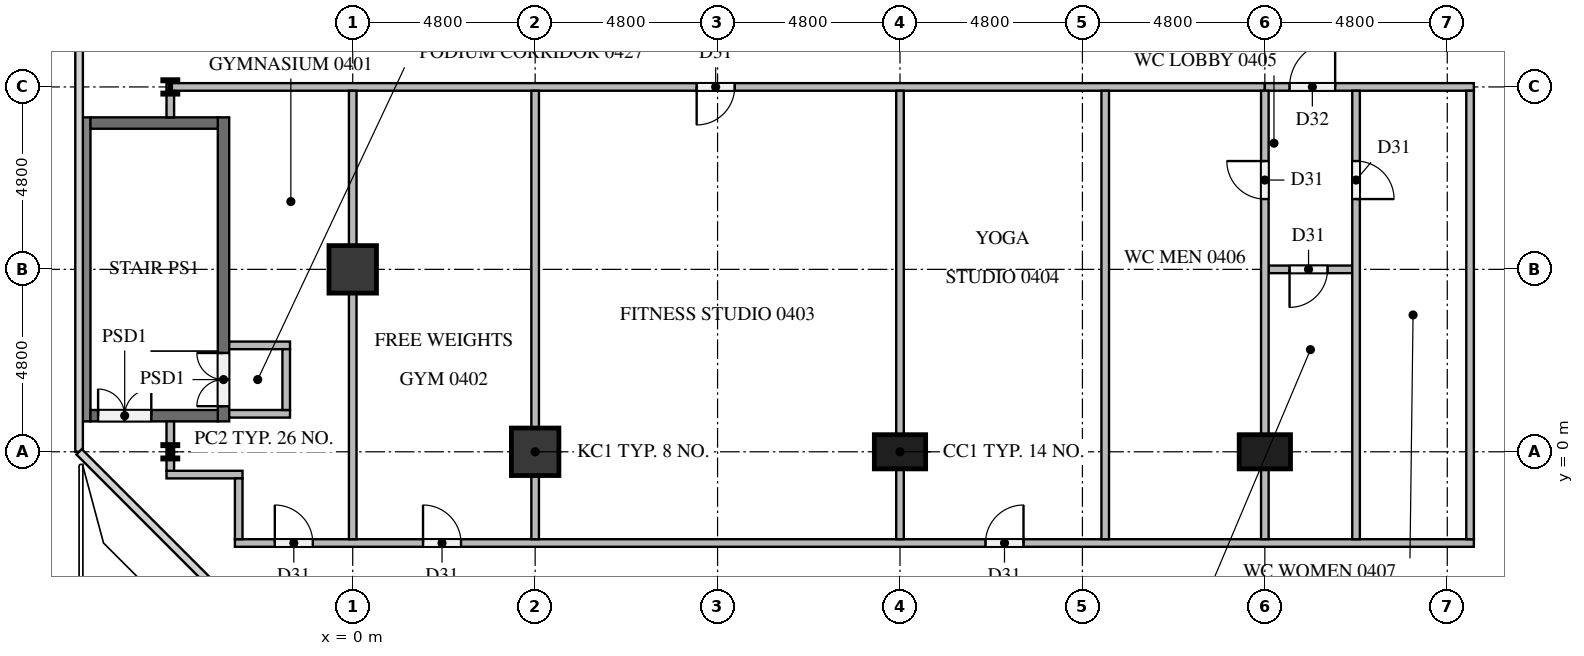
"""IFC4 building model, lengths in metres.
Left out: names, types, materials, properties, quantities, classifications, styles, units other than length and angle.
Written with IfcOpenShell. Run it as: python <this file> out.ifc"""

import sys

from ifc_helpers import new_model, si_unit, direction, frame, frame_2d, origin, origin_2d, place, context, subcontext, project, spatial, rectangle, i_section, extrude, element, fill, save


model = new_model("IFC4")
c1 = context("Model", 3, precision=1e-05, world=origin(), true_north=direction((0.0, 1.0)))
c2 = subcontext(c1, "Body", "Model", "MODEL_VIEW")
j1 = project(units=[si_unit("LENGTHUNIT", "METRE"), si_unit("PLANEANGLEUNIT", "RADIAN")], contexts=[c1])
p1 = place(None, origin())
s1 = spatial("IfcSite", under=j1, at=p1, CompositionType="ELEMENT")
p2 = place(p1, origin())
s2 = spatial("IfcBuilding", under=s1, at=p2, CompositionType="ELEMENT")
p3 = place(p2, frame((0.0, 0.0, 19.5)))
s3 = spatial("IfcBuildingStorey", under=s2, at=p3, CompositionType="ELEMENT", Elevation=19.5)
p4 = place(p3, frame((-7.05, 0.8, 0.0), z_axis=(0.0, 0.0, 1.0), x_axis=(0.0, 1.0, 0.0)))
e1 = element("IfcWall", 1, at=p4, inside=s3, PredefinedType="SOLIDWALL", context=c2, shape_type="SweptSolid", body=[
    extrude(rectangle(XDim=8.0, YDim=0.3, at=frame_2d((4.0, 0.0))), origin(), (0.0, 0.0, 1.0), 4.1),
])
p5 = place(p3, frame((-3.4, 0.8, 0.0), z_axis=(0.0, 0.0, 1.0), x_axis=(0.0, 1.0, 0.0)))
e2 = element("IfcWall", 2, at=p5, inside=s3, PredefinedType="SOLIDWALL", context=c2, shape_type="SweptSolid", body=[
    extrude(rectangle(XDim=8.0, YDim=0.3, at=frame_2d((4.0, 0.0))), origin(), (0.0, 0.0, 1.0), 4.1),
])
p6 = place(p5, frame((0.4, 0.0, 0.0)))
e3 = element("IfcOpeningElement", 3, at=p6, cuts=e2, PredefinedType="OPENING", context=c2, shape_type="SweptSolid", body=[
    extrude(rectangle(XDim=1.4, YDim=2.1, at=frame_2d((0.7, 1.05))), frame((0.0, 0.16, 0.0), z_axis=(0.0, -1.0, 0.0), x_axis=(1.0, 0.0, 0.0)), (0.0, 0.0, 1.0), 0.32),
])
p7 = place(p3, frame((-6.9, 0.95, 0.0), z_axis=(0.0, 0.0, 1.0), x_axis=(1.0, 0.0, 0.0)))
e4 = element("IfcWall", 4, at=p7, inside=s3, PredefinedType="SOLIDWALL", context=c2, shape_type="SweptSolid", body=[
    extrude(rectangle(XDim=3.35, YDim=0.3, at=frame_2d((1.675, 0.0))), origin(), (0.0, 0.0, 1.0), 4.1),
])
p8 = place(p7, frame((0.2, 0.0, 0.0)))
e5 = element("IfcOpeningElement", 5, at=p8, cuts=e4, PredefinedType="OPENING", context=c2, shape_type="SweptSolid", body=[
    extrude(rectangle(XDim=1.4, YDim=2.1, at=frame_2d((0.7, 1.05))), frame((0.0, 0.16, 0.0), z_axis=(0.0, -1.0, 0.0), x_axis=(1.0, 0.0, 0.0)), (0.0, 0.0, 1.0), 0.32),
])
p9 = place(p3, frame((-6.9, 8.65, 0.0), z_axis=(0.0, 0.0, 1.0), x_axis=(1.0, 0.0, 0.0)))
e6 = element("IfcWall", 6, at=p9, inside=s3, PredefinedType="SOLIDWALL", context=c2, shape_type="SweptSolid", body=[
    extrude(rectangle(XDim=3.35, YDim=0.3, at=frame_2d((1.675, 0.0))), origin(), (0.0, 0.0, 1.0), 4.1),
])
p10 = place(p3, frame((4.8, 0.0, 0.0), z_axis=(0.0, 0.0, 1.0), x_axis=(1.0, 0.0, 0.0)))
e7 = element("IfcColumn", 7, at=p10, inside=s3, PredefinedType="COLUMN", context=c2, shape_type="SweptSolid", body=[
    extrude(rectangle(XDim=1.25, YDim=1.25, at=origin_2d()), origin(), (0.0, 0.0, 1.0), 4.1),
])
for number, where, z_axis, x_axis in (
    (8, (14.4, 0.0, 0.0), (0.0, 0.0, 1.0), (1.0, 0.0, 0.0)),
    (9, (24.0, 0.0, 0.0), (0.0, 0.0, 1.0), (1.0, 0.0, 0.0)),
):
    element("IfcColumn", number, at=place(p3, frame(where, z_axis=z_axis, x_axis=x_axis)), inside=s3, PredefinedType="COLUMN", context=c2, shape_type="SweptSolid", body=[
        extrude(rectangle(XDim=1.35, YDim=0.9, at=origin_2d()), origin(), (0.0, 0.0, 1.0), 4.1),
    ])
p11 = place(p3, frame((0.0, 4.8, 0.0), z_axis=(0.0, 0.0, 1.0), x_axis=(1.0, 0.0, 0.0)))
e10 = element("IfcColumn", 10, at=p11, inside=s3, PredefinedType="COLUMN", context=c2, shape_type="SweptSolid", body=[
    extrude(rectangle(XDim=1.25, YDim=1.25, at=origin_2d()), origin(), (0.0, 0.0, 1.0), 4.1),
])
for number, where, z_axis, x_axis in (
    (11, (-4.8, 0.0, 0.0), (0.0, 0.0, 1.0), (1.0, 0.0, 0.0)),
    (12, (-4.8, 9.6, 0.0), (0.0, 0.0, 1.0), (1.0, 0.0, 0.0)),
):
    element("IfcColumn", number, at=place(p3, frame(where, z_axis=z_axis, x_axis=x_axis)), inside=s3, PredefinedType="COLUMN", context=c2, shape_type="SweptSolid", body=[
        extrude(i_section(OverallWidth=0.396, OverallDepth=0.381, WebThickness=0.019, FlangeThickness=0.03, at=origin_2d()), origin(), (0.0, 0.0, 1.0), 4.1),
    ])
p12 = place(p3, frame((-3.1, -2.4, 0.0), z_axis=(0.0, 0.0, 1.0), x_axis=(1.0, 0.0, 0.0)))
e13 = element("IfcWall", 13, at=p12, inside=s3, PredefinedType="PARTITIONING", context=c2, shape_type="SweptSolid", body=[
    extrude(rectangle(XDim=32.6, YDim=0.2, at=frame_2d((16.3, 0.0))), origin(), (0.0, 0.0, 1.0), 4.1),
])
p13 = place(p12, frame((1.05, 0.0, 0.0)))
e14 = element("IfcOpeningElement", 14, at=p13, cuts=e13, PredefinedType="OPENING", context=c2, shape_type="SweptSolid", body=[
    extrude(rectangle(XDim=1.0, YDim=2.1, at=frame_2d((0.5, 1.05))), frame((0.0, 0.11, 0.0), z_axis=(0.0, -1.0, 0.0), x_axis=(1.0, 0.0, 0.0)), (0.0, 0.0, 1.0), 0.22),
])
p14 = place(p12, frame((4.95, 0.0, 0.0)))
e15 = element("IfcOpeningElement", 15, at=p14, cuts=e13, PredefinedType="OPENING", context=c2, shape_type="SweptSolid", body=[
    extrude(rectangle(XDim=1.0, YDim=2.1, at=frame_2d((0.5, 1.05))), frame((0.0, 0.11, 0.0), z_axis=(0.0, -1.0, 0.0), x_axis=(1.0, 0.0, 0.0)), (0.0, 0.0, 1.0), 0.22),
])
p15 = place(p12, frame((19.75, 0.0, 0.0)))
e16 = element("IfcOpeningElement", 16, at=p15, cuts=e13, PredefinedType="OPENING", context=c2, shape_type="SweptSolid", body=[
    extrude(rectangle(XDim=1.0, YDim=2.1, at=frame_2d((0.5, 1.05))), frame((0.0, 0.11, 0.0), z_axis=(0.0, -1.0, 0.0), x_axis=(1.0, 0.0, 0.0)), (0.0, 0.0, 1.0), 0.22),
])
p16 = place(p3, frame((-4.9, -0.6, 0.0), z_axis=(0.0, 0.0, 1.0), x_axis=(1.0, 0.0, 0.0)))
e17 = element("IfcWall", 17, at=p16, inside=s3, PredefinedType="PARTITIONING", context=c2, shape_type="SweptSolid", body=[
    extrude(rectangle(XDim=2.0, YDim=0.2, at=frame_2d((1.0, 0.0))), origin(), (0.0, 0.0, 1.0), 4.1),
])
for number, where, z_axis, x_axis in (
    (18, (-3.25, 1.0, 0.0), (0.0, 0.0, 1.0), (1.0, 0.0, 0.0)),
    (19, (-3.25, 2.8, 0.0), (0.0, 0.0, 1.0), (1.0, 0.0, 0.0)),
):
    element("IfcWall", number, at=place(p3, frame(where, z_axis=z_axis, x_axis=x_axis)), inside=s3, PredefinedType="PARTITIONING", context=c2, shape_type="SweptSolid", body=[
        extrude(rectangle(XDim=1.6, YDim=0.2, at=frame_2d((0.8, 0.0))), origin(), (0.0, 0.0, 1.0), 4.1),
    ])
p17 = place(p3, frame((26.3, 4.8, 0.0), z_axis=(0.0, 0.0, 1.0), x_axis=(-1.0, 0.0, 0.0)))
e20 = element("IfcWall", 20, at=p17, inside=s3, PredefinedType="PARTITIONING", context=c2, shape_type="SweptSolid", body=[
    extrude(rectangle(XDim=2.2, YDim=0.2, at=frame_2d((1.1, 0.0))), origin(), (0.0, 0.0, 1.0), 4.1),
])
p18 = place(p17, frame((0.65, 0.0, 0.0)))
e21 = element("IfcOpeningElement", 21, at=p18, cuts=e20, PredefinedType="OPENING", context=c2, shape_type="SweptSolid", body=[
    extrude(rectangle(XDim=1.0, YDim=2.1, at=frame_2d((0.5, 1.05))), frame((0.0, 0.11, 0.0), z_axis=(0.0, -1.0, 0.0), x_axis=(1.0, 0.0, 0.0)), (0.0, 0.0, 1.0), 0.22),
])
p19 = place(p3, frame((24.0, 9.6, 0.0), z_axis=(0.0, 0.0, 1.0), x_axis=(-1.0, 0.0, 0.0)))
e22 = element("IfcWall", 22, at=p19, inside=s3, PredefinedType="PARTITIONING", context=c2, shape_type="SweptSolid", body=[
    extrude(rectangle(XDim=28.9, YDim=0.2, at=frame_2d((14.45, 0.0))), origin(), (0.0, 0.0, 1.0), 4.1),
])
p20 = place(p19, frame((13.95, 0.0, 0.0)))
e23 = element("IfcOpeningElement", 23, at=p20, cuts=e22, PredefinedType="OPENING", context=c2, shape_type="SweptSolid", body=[
    extrude(rectangle(XDim=1.0, YDim=2.1, at=frame_2d((0.5, 1.05))), frame((0.0, 0.11, 0.0), z_axis=(0.0, -1.0, 0.0), x_axis=(1.0, 0.0, 0.0)), (0.0, 0.0, 1.0), 0.22),
])
p21 = place(p3, frame((24.0, 9.6, 0.0), z_axis=(0.0, 0.0, 1.0), x_axis=(1.0, 0.0, 0.0)))
e24 = element("IfcWall", 24, at=p21, inside=s3, PredefinedType="PARTITIONING", context=c2, shape_type="SweptSolid", body=[
    extrude(rectangle(XDim=5.5, YDim=0.2, at=frame_2d((2.75, 0.0))), origin(), (0.0, 0.0, 1.0), 4.1),
])
p22 = place(p21, frame((0.65, 0.0, 0.0)))
e25 = element("IfcOpeningElement", 25, at=p22, cuts=e24, PredefinedType="OPENING", context=c2, shape_type="SweptSolid", body=[
    extrude(rectangle(XDim=1.2, YDim=2.1, at=frame_2d((0.6, 1.05))), frame((0.0, 0.11, 0.0), z_axis=(0.0, -1.0, 0.0), x_axis=(1.0, 0.0, 0.0)), (0.0, 0.0, 1.0), 0.22),
])
p23 = place(p3, frame((-4.8, -0.5, 0.0), z_axis=(0.0, 0.0, 1.0), x_axis=(0.0, 1.0, 0.0)))
e26 = element("IfcWall", 26, at=p23, inside=s3, PredefinedType="PARTITIONING", context=c2, shape_type="SweptSolid", body=[
    extrude(rectangle(XDim=1.3, YDim=0.2, at=frame_2d((0.65, 0.0))), origin(), (0.0, 0.0, 1.0), 4.1),
])
p24 = place(p3, frame((-4.8, 8.8, 0.0), z_axis=(0.0, 0.0, 1.0), x_axis=(0.0, 1.0, 0.0)))
e27 = element("IfcWall", 27, at=p24, inside=s3, PredefinedType="PARTITIONING", context=c2, shape_type="SweptSolid", body=[
    extrude(rectangle(XDim=0.7, YDim=0.2, at=frame_2d((0.35, 0.0))), origin(), (0.0, 0.0, 1.0), 4.1),
])
p25 = place(p3, frame((-3.0, -2.3, 0.0), z_axis=(0.0, 0.0, 1.0), x_axis=(0.0, 1.0, 0.0)))
e28 = element("IfcWall", 28, at=p25, inside=s3, PredefinedType="PARTITIONING", context=c2, shape_type="SweptSolid", body=[
    extrude(rectangle(XDim=1.6, YDim=0.2, at=frame_2d((0.8, 0.0))), origin(), (0.0, 0.0, 1.0), 4.1),
])
p26 = place(p3, frame((-1.75, 1.1, 0.0), z_axis=(0.0, 0.0, 1.0), x_axis=(0.0, 1.0, 0.0)))
e29 = element("IfcWall", 29, at=p26, inside=s3, PredefinedType="PARTITIONING", context=c2, shape_type="SweptSolid", body=[
    extrude(rectangle(XDim=1.6, YDim=0.2, at=frame_2d((0.8, 0.0))), origin(), (0.0, 0.0, 1.0), 4.1),
])
for number, where, z_axis, x_axis in (
    (30, (0.0, -2.3, 0.0), (0.0, 0.0, 1.0), (0.0, 1.0, 0.0)),
    (31, (4.8, -2.3, 0.0), (0.0, 0.0, 1.0), (0.0, 1.0, 0.0)),
    (32, (14.4, -2.3, 0.0), (0.0, 0.0, 1.0), (0.0, 1.0, 0.0)),
    (33, (19.8, -2.3, 0.0), (0.0, 0.0, 1.0), (0.0, 1.0, 0.0)),
):
    element("IfcWall", number, at=place(p3, frame(where, z_axis=z_axis, x_axis=x_axis)), inside=s3, PredefinedType="PARTITIONING", context=c2, shape_type="SweptSolid", body=[
        extrude(rectangle(XDim=11.8, YDim=0.2, at=frame_2d((5.9, 0.0))), origin(), (0.0, 0.0, 1.0), 4.1),
    ])
p27 = place(p3, frame((24.0, -2.3, 0.0), z_axis=(0.0, 0.0, 1.0), x_axis=(0.0, 1.0, 0.0)))
e34 = element("IfcWall", 34, at=p27, inside=s3, PredefinedType="PARTITIONING", context=c2, shape_type="SweptSolid", body=[
    extrude(rectangle(XDim=11.8, YDim=0.2, at=frame_2d((5.9, 0.0))), origin(), (0.0, 0.0, 1.0), 4.1),
])
p28 = place(p27, frame((8.95, 0.0, 0.0)))
e35 = element("IfcOpeningElement", 35, at=p28, cuts=e34, PredefinedType="OPENING", context=c2, shape_type="SweptSolid", body=[
    extrude(rectangle(XDim=1.0, YDim=2.1, at=frame_2d((0.5, 1.05))), frame((0.0, 0.11, 0.0), z_axis=(0.0, -1.0, 0.0), x_axis=(1.0, 0.0, 0.0)), (0.0, 0.0, 1.0), 0.22),
])
p29 = place(p3, frame((26.4, 9.5, 0.0), z_axis=(0.0, 0.0, 1.0), x_axis=(0.0, -1.0, 0.0)))
e36 = element("IfcWall", 36, at=p29, inside=s3, PredefinedType="PARTITIONING", context=c2, shape_type="SweptSolid", body=[
    extrude(rectangle(XDim=11.8, YDim=0.2, at=frame_2d((5.9, 0.0))), origin(), (0.0, 0.0, 1.0), 4.1),
])
p30 = place(p29, frame((1.85, 0.0, 0.0)))
e37 = element("IfcOpeningElement", 37, at=p30, cuts=e36, PredefinedType="OPENING", context=c2, shape_type="SweptSolid", body=[
    extrude(rectangle(XDim=1.0, YDim=2.1, at=frame_2d((0.5, 1.05))), frame((0.0, 0.11, 0.0), z_axis=(0.0, -1.0, 0.0), x_axis=(1.0, 0.0, 0.0)), (0.0, 0.0, 1.0), 0.22),
])
p31 = place(p3, frame((29.4, -2.3, 0.0), z_axis=(0.0, 0.0, 1.0), x_axis=(0.0, 1.0, 0.0)))
e38 = element("IfcWall", 38, at=p31, inside=s3, PredefinedType="PARTITIONING", context=c2, shape_type="SweptSolid", body=[
    extrude(rectangle(XDim=11.8, YDim=0.2, at=frame_2d((5.9, 0.0))), origin(), (0.0, 0.0, 1.0), 4.1),
])
p32 = place(p6, origin())
e39 = element("IfcDoor", 39, at=p32, inside=s3, OperationType="DOUBLE_DOOR_SINGLE_SWING", PredefinedType="DOOR", context=c2, shape_type="SweptSolid", body=[
    extrude(rectangle(XDim=1.4, YDim=2.1, at=frame_2d((0.7, 1.05))), frame((0.0, 0.025, 0.0), z_axis=(0.0, -1.0, 0.0), x_axis=(1.0, 0.0, 0.0)), (0.0, 0.0, 1.0), 0.05),
])
fill(e3, e39)
p33 = place(p8, origin())
e40 = element("IfcDoor", 40, at=p33, inside=s3, OperationType="DOUBLE_DOOR_SINGLE_SWING", PredefinedType="DOOR", context=c2, shape_type="SweptSolid", body=[
    extrude(rectangle(XDim=1.4, YDim=2.1, at=frame_2d((0.7, 1.05))), frame((0.0, 0.025, 0.0), z_axis=(0.0, -1.0, 0.0), x_axis=(1.0, 0.0, 0.0)), (0.0, 0.0, 1.0), 0.05),
])
fill(e5, e40)
p34 = place(p13, origin())
e41 = element("IfcDoor", 41, at=p34, inside=s3, OperationType="SINGLE_SWING_LEFT", PredefinedType="DOOR", context=c2, shape_type="SweptSolid", body=[
    extrude(rectangle(XDim=1.0, YDim=2.1, at=frame_2d((0.5, 1.05))), frame((0.0, 0.025, 0.0), z_axis=(0.0, -1.0, 0.0), x_axis=(1.0, 0.0, 0.0)), (0.0, 0.0, 1.0), 0.05),
])
fill(e14, e41)
p35 = place(p14, origin())
e42 = element("IfcDoor", 42, at=p35, inside=s3, OperationType="SINGLE_SWING_LEFT", PredefinedType="DOOR", context=c2, shape_type="SweptSolid", body=[
    extrude(rectangle(XDim=1.0, YDim=2.1, at=frame_2d((0.5, 1.05))), frame((0.0, 0.025, 0.0), z_axis=(0.0, -1.0, 0.0), x_axis=(1.0, 0.0, 0.0)), (0.0, 0.0, 1.0), 0.05),
])
fill(e15, e42)
p36 = place(p20, origin())
e43 = element("IfcDoor", 43, at=p36, inside=s3, OperationType="SINGLE_SWING_RIGHT", PredefinedType="DOOR", context=c2, shape_type="SweptSolid", body=[
    extrude(rectangle(XDim=1.0, YDim=2.1, at=frame_2d((0.5, 1.05))), frame((0.0, 0.025, 0.0), z_axis=(0.0, -1.0, 0.0), x_axis=(1.0, 0.0, 0.0)), (0.0, 0.0, 1.0), 0.05),
])
fill(e23, e43)
p37 = place(p15, origin())
e44 = element("IfcDoor", 44, at=p37, inside=s3, OperationType="SINGLE_SWING_RIGHT", PredefinedType="DOOR", context=c2, shape_type="SweptSolid", body=[
    extrude(rectangle(XDim=1.0, YDim=2.1, at=frame_2d((0.5, 1.05))), frame((0.0, 0.025, 0.0), z_axis=(0.0, -1.0, 0.0), x_axis=(1.0, 0.0, 0.0)), (0.0, 0.0, 1.0), 0.05),
])
fill(e16, e44)
p38 = place(p22, origin())
e45 = element("IfcDoor", 45, at=p38, inside=s3, OperationType="SINGLE_SWING_RIGHT", PredefinedType="DOOR", context=c2, shape_type="SweptSolid", body=[
    extrude(rectangle(XDim=1.2, YDim=2.1, at=frame_2d((0.6, 1.05))), frame((0.0, 0.025, 0.0), z_axis=(0.0, -1.0, 0.0), x_axis=(1.0, 0.0, 0.0)), (0.0, 0.0, 1.0), 0.05),
])
fill(e25, e45)
p39 = place(p28, origin())
e46 = element("IfcDoor", 46, at=p39, inside=s3, OperationType="SINGLE_SWING_RIGHT", PredefinedType="DOOR", context=c2, shape_type="SweptSolid", body=[
    extrude(rectangle(XDim=1.0, YDim=2.1, at=frame_2d((0.5, 1.05))), frame((0.0, 0.025, 0.0), z_axis=(0.0, -1.0, 0.0), x_axis=(1.0, 0.0, 0.0)), (0.0, 0.0, 1.0), 0.05),
])
fill(e35, e46)
p40 = place(p30, origin())
e47 = element("IfcDoor", 47, at=p40, inside=s3, OperationType="SINGLE_SWING_RIGHT", PredefinedType="DOOR", context=c2, shape_type="SweptSolid", body=[
    extrude(rectangle(XDim=1.0, YDim=2.1, at=frame_2d((0.5, 1.05))), frame((0.0, 0.025, 0.0), z_axis=(0.0, -1.0, 0.0), x_axis=(1.0, 0.0, 0.0)), (0.0, 0.0, 1.0), 0.05),
])
fill(e37, e47)
p41 = place(p18, origin())
e48 = element("IfcDoor", 48, at=p41, inside=s3, OperationType="SINGLE_SWING_RIGHT", PredefinedType="DOOR", context=c2, shape_type="SweptSolid", body=[
    extrude(rectangle(XDim=1.0, YDim=2.1, at=frame_2d((0.5, 1.05))), frame((0.0, 0.025, 0.0), z_axis=(0.0, -1.0, 0.0), x_axis=(1.0, 0.0, 0.0)), (0.0, 0.0, 1.0), 0.05),
])
fill(e21, e48)
save(model, sys.argv[1])
